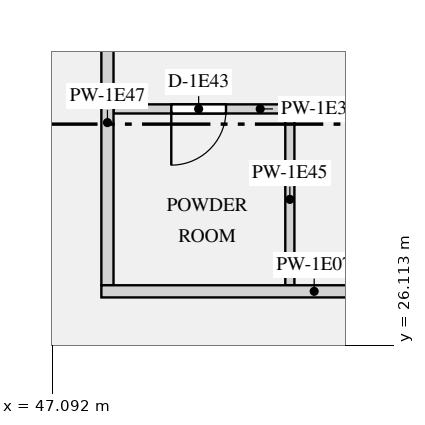
"""IFC4 building model, lengths in metres.
Left out: names, types, materials, properties, quantities, classifications, styles, units other than length and angle.
Written with IfcOpenShell. Run it as: python <this file> out.ifc"""

import sys

from ifc_helpers import new_model, si_unit, direction, frame, frame_2d, origin, place, context, subcontext, project, spatial, rectangle, extrude, element, fill, save


model = new_model("IFC4")
c1 = context("Model", 3, precision=1e-05, world=origin(), true_north=direction((0.0, 1.0)))
c2 = subcontext(c1, "Body", "Model", "MODEL_VIEW")
j1 = project(units=[si_unit("LENGTHUNIT", "METRE"), si_unit("PLANEANGLEUNIT", "RADIAN")], contexts=[c1])
p1 = place(None, origin())
s1 = spatial("IfcSite", under=j1, at=p1, CompositionType="ELEMENT")
p2 = place(p1, origin())
s2 = spatial("IfcBuilding", under=s1, at=p2, CompositionType="ELEMENT")
p3 = place(p2, frame((0.0, 0.0, 54.15)))
s3 = spatial("IfcBuildingStorey", under=s2, at=p3, CompositionType="ELEMENT", Elevation=54.15)
p4 = place(p3, frame((47.9, 27.0, 0.0), z_axis=(0.0, 0.0, 1.0), x_axis=(1.0, 0.0, 0.0)))
e1 = element("IfcWall", 1, at=p4, inside=s3, PredefinedType="PARTITIONING", context=c2, shape_type="SweptSolid", body=[
    extrude(rectangle(XDim=7.0, YDim=0.2, at=frame_2d((3.5, 0.0))), origin(), (0.0, 0.0, 1.0), 2.83),
])
p5 = place(p3, frame((48.1, 30.0, 0.0), z_axis=(0.0, 0.0, 1.0), x_axis=(1.0, 0.0, 0.0)))
e2 = element("IfcWall", 2, at=p5, inside=s3, PredefinedType="PARTITIONING", context=c2, shape_type="SweptSolid", body=[
    extrude(rectangle(XDim=2.975, YDim=0.15, at=frame_2d((1.487, 0.0))), origin(), (0.0, 0.0, 1.0), 2.83),
])
p6 = place(p5, frame((0.95, 0.0, 0.0)))
e3 = element("IfcOpeningElement", 3, at=p6, cuts=e2, PredefinedType="OPENING", context=c2, shape_type="SweptSolid", body=[
    extrude(rectangle(XDim=0.9, YDim=2.1, at=frame_2d((0.45, 1.05))), frame((0.0, 0.085, 0.0), z_axis=(0.0, -1.0, 0.0), x_axis=(1.0, 0.0, 0.0)), (0.0, 0.0, 1.0), 0.17),
])
p7 = place(p3, frame((51.0, 27.1, 0.0), z_axis=(0.0, 0.0, 1.0), x_axis=(0.0, 1.0, 0.0)))
e4 = element("IfcWall", 4, at=p7, inside=s3, PredefinedType="PARTITIONING", context=c2, shape_type="SweptSolid", body=[
    extrude(rectangle(XDim=2.825, YDim=0.15, at=frame_2d((1.413, 0.0))), origin(), (0.0, 0.0, 1.0), 2.83),
])
p8 = place(p3, frame((48.0, 27.1, 0.0), z_axis=(0.0, 0.0, 1.0), x_axis=(0.0, 1.0, 0.0)))
e5 = element("IfcWall", 5, at=p8, inside=s3, PredefinedType="PARTITIONING", context=c2, shape_type="SweptSolid", body=[
    extrude(rectangle(XDim=11.325, YDim=0.2, at=frame_2d((5.663, 0.0))), origin(), (0.0, 0.0, 1.0), 2.83),
])
p9 = place(p8, frame((5.35, 0.0, 0.0)))
e6 = element("IfcOpeningElement", 6, at=p9, cuts=e5, PredefinedType="OPENING", context=c2, shape_type="SweptSolid", body=[
    extrude(rectangle(XDim=1.1, YDim=2.1, at=frame_2d((0.55, 1.05))), frame((0.0, 0.11, 0.0), z_axis=(0.0, -1.0, 0.0), x_axis=(1.0, 0.0, 0.0)), (0.0, 0.0, 1.0), 0.22),
])
p10 = place(p6, frame((0.9, 0.0, 0.0), z_axis=(0.0, 0.0, 1.0), x_axis=(-1.0, 0.0, 0.0)))
e7 = element("IfcDoor", 7, at=p10, inside=s3, OperationType="SINGLE_SWING_RIGHT", PredefinedType="DOOR", context=c2, shape_type="SweptSolid", body=[
    extrude(rectangle(XDim=0.9, YDim=2.1, at=frame_2d((0.45, 1.05))), frame((0.0, 0.025, 0.0), z_axis=(0.0, -1.0, 0.0), x_axis=(1.0, 0.0, 0.0)), (0.0, 0.0, 1.0), 0.05),
])
fill(e3, e7)
save(model, sys.argv[1])
